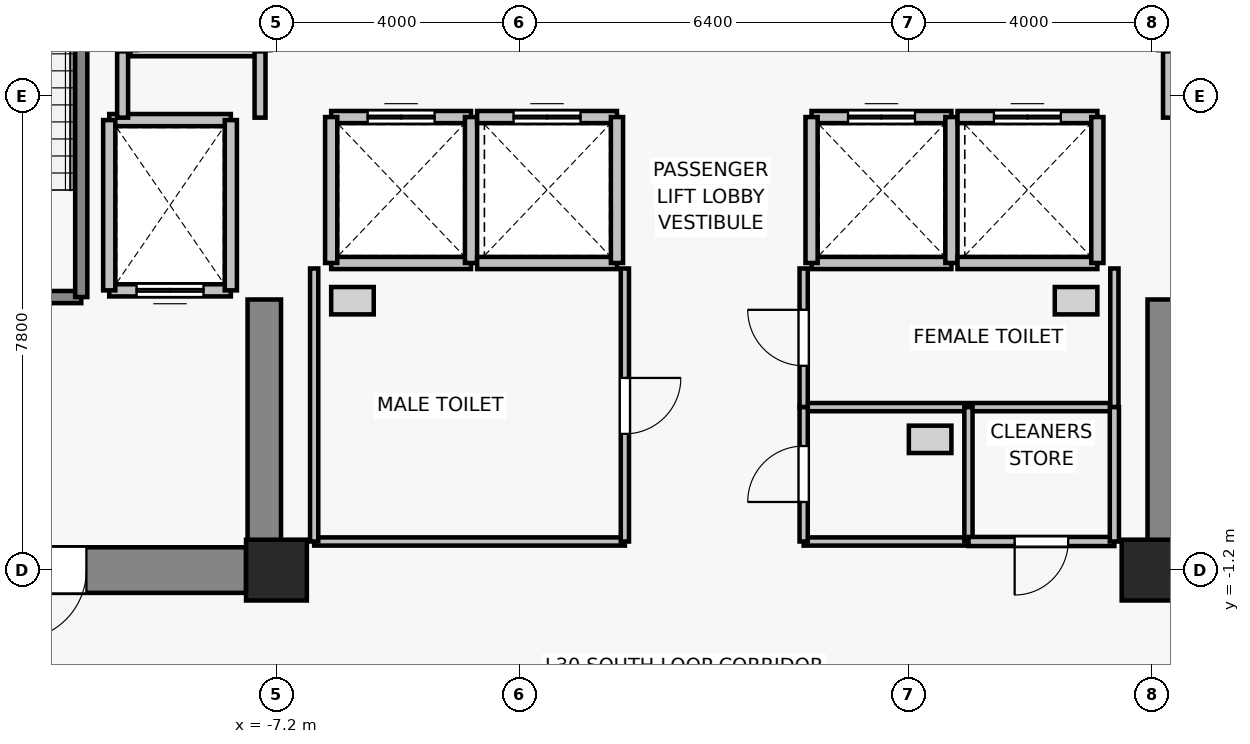
"""IFC4 building model, lengths in metres.
Left out: names, types, materials, properties, quantities, classifications, styles, units other than length and angle.
Written with IfcOpenShell. Run it as: python <this file> out.ifc"""

import sys

from ifc_helpers import new_model, si_unit, direction, frame, frame_2d, origin, origin_2d, place, context, subcontext, project, spatial, rectangle, extrude, source, transform, mapped, element, fill, save


model = new_model("IFC4")
c1 = context("Model", 3, precision=1e-05, world=origin(), true_north=direction((0.0, 1.0)))
c2 = subcontext(c1, "Body", "Model", "MODEL_VIEW")
j1 = project(units=[si_unit("LENGTHUNIT", "METRE"), si_unit("PLANEANGLEUNIT", "RADIAN")], contexts=[c1])
p1 = place(None, origin())
s1 = spatial("IfcSite", under=j1, at=p1, CompositionType="ELEMENT")
p2 = place(p1, origin())
s2 = spatial("IfcBuilding", under=s1, at=p2, CompositionType="ELEMENT")
p3 = place(p2, frame((0.0, 0.0, 109.9)))
s3 = spatial("IfcBuildingStorey", under=s2, at=p3, CompositionType="ELEMENT", Elevation=109.9)
for number, where, z_axis, x_axis in (
    (1, (-7.2, -1.2, 0.0), (0.0, 0.0, 1.0), (1.0, 0.0, 0.0)),
    (2, (7.2, -1.2, 0.0), (0.0, 0.0, 1.0), (1.0, 0.0, 0.0)),
):
    element("IfcColumn", number, at=place(p3, frame(where, z_axis=z_axis, x_axis=x_axis)), inside=s3, PredefinedType="COLUMN", context=c2, shape_type="SweptSolid", body=[
        extrude(rectangle(XDim=1.0, YDim=1.0, at=origin_2d()), origin(), (0.0, 0.0, 1.0), 3.3),
    ])
p4 = place(p3, frame((-7.7, -1.2, 0.0), z_axis=(0.0, 0.0, 1.0), x_axis=(-1.0, 0.0, 0.0)))
e3 = element("IfcWall", 3, at=p4, inside=s3, PredefinedType="SHEAR", context=c2, shape_type="SweptSolid", body=[
    extrude(rectangle(XDim=6.2, YDim=0.75, at=frame_2d((3.1, 0.0))), origin(), (0.0, 0.0, 1.0), 3.075),
])
p5 = place(p4, frame((2.625, 0.0, 0.0)))
e4 = element("IfcOpeningElement", 4, at=p5, cuts=e3, PredefinedType="OPENING", context=c2, shape_type="SweptSolid", body=[
    extrude(rectangle(XDim=1.15, YDim=2.15, at=frame_2d((0.575, 1.075))), frame((0.0, 0.385, 0.0), z_axis=(0.0, -1.0, 0.0), x_axis=(1.0, 0.0, 0.0)), (0.0, 0.0, 1.0), 0.77),
])
for number, where, z_axis, x_axis in (
    (5, (-7.4, -0.825, 0.0), (0.0, 0.0, 1.0), (0.0, 1.0, 0.0)),
    (6, (7.4, -0.825, 0.0), (0.0, 0.0, 1.0), (0.0, 1.0, 0.0)),
):
    element("IfcWall", number, at=place(p3, frame(where, z_axis=z_axis, x_axis=x_axis)), inside=s3, PredefinedType="SHEAR", context=c2, shape_type="SweptSolid", body=[
        extrude(rectangle(XDim=4.075, YDim=0.55, at=frame_2d((2.038, 0.0))), origin(), (0.0, 0.0, 1.0), 3.075),
    ])
p6 = place(p3, frame((-7.95, 3.4, 0.0), z_axis=(0.0, 0.0, 1.0), x_axis=(-1.0, 0.0, 0.0)))
e7 = element("IfcWall", 7, at=p6, inside=s3, PredefinedType="SOLIDWALL", context=c2, shape_type="SweptSolid", body=[
    extrude(rectangle(XDim=2.0, YDim=0.2, at=frame_2d((1.0, 0.0))), origin(), (0.0, 0.0, 1.0), 3.075),
])
p7 = place(p6, frame((0.45, 0.0, 0.0)))
e8 = element("IfcOpeningElement", 8, at=p7, cuts=e7, PredefinedType="OPENING", context=c2, shape_type="SweptSolid", body=[
    extrude(rectangle(XDim=1.1, YDim=2.2, at=frame_2d((0.55, 1.1))), frame((0.0, 0.11, 0.0), z_axis=(0.0, -1.0, 0.0), x_axis=(1.0, 0.0, 0.0)), (0.0, 0.0, 1.0), 0.22),
])
p8 = place(p3, frame((-9.95, 6.2, 0.0), z_axis=(0.0, 0.0, 1.0), x_axis=(1.0, 0.0, 0.0)))
e9 = element("IfcWall", 9, at=p8, inside=s3, PredefinedType="SOLIDWALL", context=c2, shape_type="SweptSolid", body=[
    extrude(rectangle(XDim=2.0, YDim=0.2, at=frame_2d((1.0, 0.0))), origin(), (0.0, 0.0, 1.0), 3.075),
])
for number, where, z_axis, x_axis in (
    (10, (-9.95, 3.4, 0.0), (0.0, 0.0, 1.0), (0.0, 1.0, 0.0)),
    (11, (-7.95, 6.2, 0.0), (0.0, 0.0, 1.0), (0.0, -1.0, 0.0)),
):
    element("IfcWall", number, at=place(p3, frame(where, z_axis=z_axis, x_axis=x_axis)), inside=s3, PredefinedType="SOLIDWALL", context=c2, shape_type="SweptSolid", body=[
        extrude(rectangle(XDim=2.8, YDim=0.2, at=frame_2d((1.4, 0.0))), origin(), (0.0, 0.0, 1.0), 3.075),
    ])
p9 = place(p3, frame((-4.0, 3.85, 0.0), z_axis=(0.0, 0.0, 1.0), x_axis=(-1.0, 0.0, 0.0)))
e12 = element("IfcWall", 12, at=p9, inside=s3, PredefinedType="SOLIDWALL", context=c2, shape_type="SweptSolid", body=[
    extrude(rectangle(XDim=2.3, YDim=0.2, at=frame_2d((1.15, 0.0))), origin(), (0.0, 0.0, 1.0), 3.075),
])
p10 = place(p3, frame((-6.3, 6.25, 0.0), z_axis=(0.0, 0.0, 1.0), x_axis=(1.0, 0.0, 0.0)))
e13 = element("IfcWall", 13, at=p10, inside=s3, PredefinedType="SOLIDWALL", context=c2, shape_type="SweptSolid", body=[
    extrude(rectangle(XDim=2.3, YDim=0.2, at=frame_2d((1.15, 0.0))), origin(), (0.0, 0.0, 1.0), 3.075),
])
p11 = place(p10, frame((0.6, 0.0, 0.0)))
e14 = element("IfcOpeningElement", 14, at=p11, cuts=e13, PredefinedType="OPENING", context=c2, shape_type="SweptSolid", body=[
    extrude(rectangle(XDim=1.1, YDim=2.2, at=frame_2d((0.55, 1.1))), frame((0.0, 0.11, 0.0), z_axis=(0.0, -1.0, 0.0), x_axis=(1.0, 0.0, 0.0)), (0.0, 0.0, 1.0), 0.22),
])
for number, where, z_axis, x_axis in (
    (15, (-6.3, 3.85, 0.0), (0.0, 0.0, 1.0), (0.0, 1.0, 0.0)),
    (16, (-4.0, 6.25, 0.0), (0.0, 0.0, 1.0), (0.0, -1.0, 0.0)),
):
    element("IfcWall", number, at=place(p3, frame(where, z_axis=z_axis, x_axis=x_axis)), inside=s3, PredefinedType="SOLIDWALL", context=c2, shape_type="SweptSolid", body=[
        extrude(rectangle(XDim=2.4, YDim=0.2, at=frame_2d((1.2, 0.0))), origin(), (0.0, 0.0, 1.0), 3.075),
    ])
p12 = place(p3, frame((-1.6, 3.85, 0.0), z_axis=(0.0, 0.0, 1.0), x_axis=(-1.0, 0.0, 0.0)))
e17 = element("IfcWall", 17, at=p12, inside=s3, PredefinedType="SOLIDWALL", context=c2, shape_type="SweptSolid", body=[
    extrude(rectangle(XDim=2.3, YDim=0.2, at=frame_2d((1.15, 0.0))), origin(), (0.0, 0.0, 1.0), 3.075),
])
p13 = place(p3, frame((-3.9, 6.25, 0.0), z_axis=(0.0, 0.0, 1.0), x_axis=(1.0, 0.0, 0.0)))
e18 = element("IfcWall", 18, at=p13, inside=s3, PredefinedType="SOLIDWALL", context=c2, shape_type="SweptSolid", body=[
    extrude(rectangle(XDim=2.3, YDim=0.2, at=frame_2d((1.15, 0.0))), origin(), (0.0, 0.0, 1.0), 3.075),
])
p14 = place(p13, frame((0.6, 0.0, 0.0)))
e19 = element("IfcOpeningElement", 19, at=p14, cuts=e18, PredefinedType="OPENING", context=c2, shape_type="SweptSolid", body=[
    extrude(rectangle(XDim=1.1, YDim=2.2, at=frame_2d((0.55, 1.1))), frame((0.0, 0.11, 0.0), z_axis=(0.0, -1.0, 0.0), x_axis=(1.0, 0.0, 0.0)), (0.0, 0.0, 1.0), 0.22),
])
p15 = place(p3, frame((-1.6, 6.25, 0.0), z_axis=(0.0, 0.0, 1.0), x_axis=(0.0, -1.0, 0.0)))
e20 = element("IfcWall", 20, at=p15, inside=s3, PredefinedType="SOLIDWALL", context=c2, shape_type="SweptSolid", body=[
    extrude(rectangle(XDim=2.4, YDim=0.2, at=frame_2d((1.2, 0.0))), origin(), (0.0, 0.0, 1.0), 3.075),
])
p16 = place(p3, frame((3.9, 3.85, 0.0), z_axis=(0.0, 0.0, 1.0), x_axis=(-1.0, 0.0, 0.0)))
e21 = element("IfcWall", 21, at=p16, inside=s3, PredefinedType="SOLIDWALL", context=c2, shape_type="SweptSolid", body=[
    extrude(rectangle(XDim=2.3, YDim=0.2, at=frame_2d((1.15, 0.0))), origin(), (0.0, 0.0, 1.0), 3.075),
])
p17 = place(p3, frame((1.6, 6.25, 0.0), z_axis=(0.0, 0.0, 1.0), x_axis=(1.0, 0.0, 0.0)))
e22 = element("IfcWall", 22, at=p17, inside=s3, PredefinedType="SOLIDWALL", context=c2, shape_type="SweptSolid", body=[
    extrude(rectangle(XDim=2.3, YDim=0.2, at=frame_2d((1.15, 0.0))), origin(), (0.0, 0.0, 1.0), 3.075),
])
p18 = place(p17, frame((0.6, 0.0, 0.0)))
e23 = element("IfcOpeningElement", 23, at=p18, cuts=e22, PredefinedType="OPENING", context=c2, shape_type="SweptSolid", body=[
    extrude(rectangle(XDim=1.1, YDim=2.2, at=frame_2d((0.55, 1.1))), frame((0.0, 0.11, 0.0), z_axis=(0.0, -1.0, 0.0), x_axis=(1.0, 0.0, 0.0)), (0.0, 0.0, 1.0), 0.22),
])
for number, where, z_axis, x_axis in (
    (24, (1.6, 3.85, 0.0), (0.0, 0.0, 1.0), (0.0, 1.0, 0.0)),
    (25, (3.9, 6.25, 0.0), (0.0, 0.0, 1.0), (0.0, -1.0, 0.0)),
):
    element("IfcWall", number, at=place(p3, frame(where, z_axis=z_axis, x_axis=x_axis)), inside=s3, PredefinedType="SOLIDWALL", context=c2, shape_type="SweptSolid", body=[
        extrude(rectangle(XDim=2.4, YDim=0.2, at=frame_2d((1.2, 0.0))), origin(), (0.0, 0.0, 1.0), 3.075),
    ])
p19 = place(p3, frame((6.3, 3.85, 0.0), z_axis=(0.0, 0.0, 1.0), x_axis=(-1.0, 0.0, 0.0)))
e26 = element("IfcWall", 26, at=p19, inside=s3, PredefinedType="SOLIDWALL", context=c2, shape_type="SweptSolid", body=[
    extrude(rectangle(XDim=2.3, YDim=0.2, at=frame_2d((1.15, 0.0))), origin(), (0.0, 0.0, 1.0), 3.075),
])
p20 = place(p3, frame((4.0, 6.25, 0.0), z_axis=(0.0, 0.0, 1.0), x_axis=(1.0, 0.0, 0.0)))
e27 = element("IfcWall", 27, at=p20, inside=s3, PredefinedType="SOLIDWALL", context=c2, shape_type="SweptSolid", body=[
    extrude(rectangle(XDim=2.3, YDim=0.2, at=frame_2d((1.15, 0.0))), origin(), (0.0, 0.0, 1.0), 3.075),
])
p21 = place(p20, frame((0.6, 0.0, 0.0)))
e28 = element("IfcOpeningElement", 28, at=p21, cuts=e27, PredefinedType="OPENING", context=c2, shape_type="SweptSolid", body=[
    extrude(rectangle(XDim=1.1, YDim=2.2, at=frame_2d((0.55, 1.1))), frame((0.0, 0.11, 0.0), z_axis=(0.0, -1.0, 0.0), x_axis=(1.0, 0.0, 0.0)), (0.0, 0.0, 1.0), 0.22),
])
p22 = place(p3, frame((6.3, 6.25, 0.0), z_axis=(0.0, 0.0, 1.0), x_axis=(0.0, -1.0, 0.0)))
e29 = element("IfcWall", 29, at=p22, inside=s3, PredefinedType="SOLIDWALL", context=c2, shape_type="SweptSolid", body=[
    extrude(rectangle(XDim=2.4, YDim=0.2, at=frame_2d((1.2, 0.0))), origin(), (0.0, 0.0, 1.0), 3.075),
])
for number, where, z_axis, x_axis in (
    (30, (-7.4, 7.35, 0.0), (0.0, 0.0, 1.0), (-1.0, 0.0, 0.0)),
    (31, (9.6, 7.35, 0.0), (0.0, 0.0, 1.0), (-1.0, 0.0, 0.0)),
):
    element("IfcWall", number, at=place(p3, frame(where, z_axis=z_axis, x_axis=x_axis)), inside=s3, PredefinedType="SOLIDWALL", context=c2, shape_type="SweptSolid", body=[
        extrude(rectangle(XDim=2.2, YDim=0.2, at=frame_2d((1.1, 0.0))), origin(), (0.0, 0.0, 1.0), 2.515),
    ])
p23 = place(p3, frame((-10.41, 3.29, 0.0), z_axis=(0.0, 0.0, 1.0), x_axis=(-1.0, 0.0, 0.0)))
e32 = element("IfcWall", 32, at=p23, inside=s3, PredefinedType="SOLIDWALL", context=c2, shape_type="SweptSolid", body=[
    extrude(rectangle(XDim=3.52, YDim=0.2, at=frame_2d((1.76, 0.0))), origin(), (0.0, 0.0, 1.0), 3.075),
])
p24 = place(p23, frame((1.165, 0.0, 0.0)))
e33 = element("IfcOpeningElement", 33, at=p24, cuts=e32, PredefinedType="OPENING", context=c2, shape_type="SweptSolid", body=[
    extrude(rectangle(XDim=1.15, YDim=2.15, at=frame_2d((0.575, 1.075))), frame((0.0, 0.11, 0.0), z_axis=(0.0, -1.0, 0.0), x_axis=(1.0, 0.0, 0.0)), (0.0, 0.0, 1.0), 0.22),
])
p25 = place(p3, frame((-10.41, 12.13, 0.0), z_axis=(0.0, 0.0, 1.0), x_axis=(0.0, -1.0, 0.0)))
e34 = element("IfcWall", 34, at=p25, inside=s3, PredefinedType="SOLIDWALL", context=c2, shape_type="SweptSolid", body=[
    extrude(rectangle(XDim=8.84, YDim=0.2, at=frame_2d((4.42, 0.0))), origin(), (0.0, 0.0, 1.0), 3.075),
])
p26 = place(p3, frame((-9.73, 6.24, 0.0), z_axis=(0.0, 0.0, 1.0), x_axis=(0.0, 1.0, 0.0)))
e35 = element("IfcWall", 35, at=p26, inside=s3, PredefinedType="PARTITIONING", context=c2, shape_type="SweptSolid", body=[
    extrude(rectangle(XDim=1.09, YDim=0.18, at=frame_2d((0.545, 0.0))), origin(), (0.0, 0.0, 1.0), 3.075),
])
for number, where, z_axis, x_axis in (
    (36, (-7.47, 7.33, 0.0), (0.0, 0.0, 1.0), (0.0, -1.0, 0.0)),
    (37, (7.47, 6.24, 0.0), (0.0, 0.0, 1.0), (0.0, 1.0, 0.0)),
):
    element("IfcWall", number, at=place(p3, frame(where, z_axis=z_axis, x_axis=x_axis)), inside=s3, PredefinedType="PARTITIONING", context=c2, shape_type="SweptSolid", body=[
        extrude(rectangle(XDim=1.09, YDim=0.18, at=frame_2d((0.545, 0.0))), origin(), (0.0, 0.0, 1.0), 2.515),
    ])
p27 = place(p3, frame((-1.47, -0.73, 0.0), z_axis=(0.0, 0.0, 1.0), x_axis=(-1.0, 0.0, 0.0)))
e38 = element("IfcWall", 38, at=p27, inside=s3, PredefinedType="PARTITIONING", context=c2, shape_type="SweptSolid", body=[
    extrude(rectangle(XDim=5.11, YDim=0.135, at=frame_2d((2.555, 0.0))), origin(), (0.0, 0.0, 1.0), 3.075),
])
p28 = place(p3, frame((-6.58, -0.73, 0.0), z_axis=(0.0, 0.0, 1.0), x_axis=(0.0, 1.0, 0.0)))
e39 = element("IfcWall", 39, at=p28, inside=s3, PredefinedType="PARTITIONING", context=c2, shape_type="SweptSolid", body=[
    extrude(rectangle(XDim=4.49, YDim=0.135, at=frame_2d((2.245, 0.0))), origin(), (0.0, 0.0, 1.0), 3.075),
])
p29 = place(p3, frame((-1.47, 3.76, 0.0), z_axis=(0.0, 0.0, 1.0), x_axis=(0.0, -1.0, 0.0)))
e40 = element("IfcWall", 40, at=p29, inside=s3, PredefinedType="PARTITIONING", context=c2, shape_type="SweptSolid", body=[
    extrude(rectangle(XDim=4.49, YDim=0.135, at=frame_2d((2.245, 0.0))), origin(), (0.0, 0.0, 1.0), 3.075),
])
p30 = place(p29, frame((1.8, 0.0, 0.0)))
e41 = element("IfcOpeningElement", 41, at=p30, cuts=e40, PredefinedType="OPENING", context=c2, shape_type="SweptSolid", body=[
    extrude(rectangle(XDim=0.92, YDim=2.1, at=frame_2d((0.46, 1.05))), frame((0.0, 0.077, 0.0), z_axis=(0.0, -1.0, 0.0), x_axis=(1.0, 0.0, 0.0)), (0.0, 0.0, 1.0), 0.155),
])
p31 = place(p3, frame((6.58, 1.48, 0.0), z_axis=(0.0, 0.0, 1.0), x_axis=(-1.0, 0.0, 0.0)))
e42 = element("IfcWall", 42, at=p31, inside=s3, PredefinedType="PARTITIONING", context=c2, shape_type="SweptSolid", body=[
    extrude(rectangle(XDim=5.11, YDim=0.135, at=frame_2d((2.555, 0.0))), origin(), (0.0, 0.0, 1.0), 3.075),
])
p32 = place(p3, frame((1.47, 1.48, 0.0), z_axis=(0.0, 0.0, 1.0), x_axis=(0.0, 1.0, 0.0)))
e43 = element("IfcWall", 43, at=p32, inside=s3, PredefinedType="PARTITIONING", context=c2, shape_type="SweptSolid", body=[
    extrude(rectangle(XDim=2.28, YDim=0.135, at=frame_2d((1.14, 0.0))), origin(), (0.0, 0.0, 1.0), 3.075),
])
p33 = place(p32, frame((0.68, 0.0, 0.0)))
e44 = element("IfcOpeningElement", 44, at=p33, cuts=e43, PredefinedType="OPENING", context=c2, shape_type="SweptSolid", body=[
    extrude(rectangle(XDim=0.92, YDim=2.1, at=frame_2d((0.46, 1.05))), frame((0.0, 0.077, 0.0), z_axis=(0.0, -1.0, 0.0), x_axis=(1.0, 0.0, 0.0)), (0.0, 0.0, 1.0), 0.155),
])
p34 = place(p3, frame((6.58, 3.76, 0.0), z_axis=(0.0, 0.0, 1.0), x_axis=(0.0, -1.0, 0.0)))
e45 = element("IfcWall", 45, at=p34, inside=s3, PredefinedType="PARTITIONING", context=c2, shape_type="SweptSolid", body=[
    extrude(rectangle(XDim=2.28, YDim=0.135, at=frame_2d((1.14, 0.0))), origin(), (0.0, 0.0, 1.0), 3.075),
])
p35 = place(p3, frame((4.18, -0.73, 0.0), z_axis=(0.0, 0.0, 1.0), x_axis=(-1.0, 0.0, 0.0)))
e46 = element("IfcWall", 46, at=p35, inside=s3, PredefinedType="PARTITIONING", context=c2, shape_type="SweptSolid", body=[
    extrude(rectangle(XDim=2.71, YDim=0.135, at=frame_2d((1.355, 0.0))), origin(), (0.0, 0.0, 1.0), 3.075),
])
p36 = place(p3, frame((1.47, -0.73, 0.0), z_axis=(0.0, 0.0, 1.0), x_axis=(0.0, 1.0, 0.0)))
e47 = element("IfcWall", 47, at=p36, inside=s3, PredefinedType="PARTITIONING", context=c2, shape_type="SweptSolid", body=[
    extrude(rectangle(XDim=2.21, YDim=0.135, at=frame_2d((1.105, 0.0))), origin(), (0.0, 0.0, 1.0), 3.075),
])
p37 = place(p36, frame((0.65, 0.0, 0.0)))
e48 = element("IfcOpeningElement", 48, at=p37, cuts=e47, PredefinedType="OPENING", context=c2, shape_type="SweptSolid", body=[
    extrude(rectangle(XDim=0.92, YDim=2.1, at=frame_2d((0.46, 1.05))), frame((0.0, 0.077, 0.0), z_axis=(0.0, -1.0, 0.0), x_axis=(1.0, 0.0, 0.0)), (0.0, 0.0, 1.0), 0.155),
])
p38 = place(p3, frame((4.18, 1.48, 0.0), z_axis=(0.0, 0.0, 1.0), x_axis=(0.0, -1.0, 0.0)))
e49 = element("IfcWall", 49, at=p38, inside=s3, PredefinedType="PARTITIONING", context=c2, shape_type="SweptSolid", body=[
    extrude(rectangle(XDim=2.21, YDim=0.135, at=frame_2d((1.105, 0.0))), origin(), (0.0, 0.0, 1.0), 3.075),
])
p39 = place(p3, frame((6.58, -0.73, 0.0), z_axis=(0.0, 0.0, 1.0), x_axis=(-1.0, 0.0, 0.0)))
e50 = element("IfcWall", 50, at=p39, inside=s3, PredefinedType="PARTITIONING", context=c2, shape_type="SweptSolid", body=[
    extrude(rectangle(XDim=2.4, YDim=0.15, at=frame_2d((1.2, 0.0))), origin(), (0.0, 0.0, 1.0), 3.075),
])
p40 = place(p39, frame((0.76, 0.0, 0.0)))
e51 = element("IfcOpeningElement", 51, at=p40, cuts=e50, PredefinedType="OPENING", context=c2, shape_type="SweptSolid", body=[
    extrude(rectangle(XDim=0.88, YDim=2.1, at=frame_2d((0.44, 1.05))), frame((0.0, 0.085, 0.0), z_axis=(0.0, -1.0, 0.0), x_axis=(1.0, 0.0, 0.0)), (0.0, 0.0, 1.0), 0.17),
])
p41 = place(p3, frame((6.58, 1.48, 0.0), z_axis=(0.0, 0.0, 1.0), x_axis=(0.0, -1.0, 0.0)))
e52 = element("IfcWall", 52, at=p41, inside=s3, PredefinedType="PARTITIONING", context=c2, shape_type="SweptSolid", body=[
    extrude(rectangle(XDim=2.21, YDim=0.15, at=frame_2d((1.105, 0.0))), origin(), (0.0, 0.0, 1.0), 3.075),
])
m1 = source(origin(), c2, "Body", "SweptSolid", [
    extrude(rectangle(XDim=1.1, YDim=2.2, at=frame_2d((0.55, 1.1))), frame((0.0, 0.025, 0.0), z_axis=(0.0, -1.0, 0.0), x_axis=(1.0, 0.0, 0.0)), (0.0, 0.0, 1.0), 0.05),
])
p42 = place(p7, origin())
e53 = element("IfcDoor", 53, at=p42, inside=s3, OperationType="DOUBLE_DOOR_SLIDING", PredefinedType="DOOR", context=c2, shape_type="MappedRepresentation", body=[
    mapped(m1, transform((0.0, 0.0, 0.0), x_axis=(1.0, 0.0, 0.0), y_axis=(0.0, 1.0, 0.0), z_axis=(0.0, 0.0, 1.0), scale=1.0)),
])
fill(e8, e53)
p43 = place(p11, origin())
e54 = element("IfcDoor", 54, at=p43, inside=s3, OperationType="DOUBLE_DOOR_SLIDING", PredefinedType="DOOR", context=c2, shape_type="MappedRepresentation", body=[
    mapped(m1, transform((0.0, 0.0, 0.0), x_axis=(1.0, 0.0, 0.0), y_axis=(0.0, 1.0, 0.0), z_axis=(0.0, 0.0, 1.0), scale=1.0)),
])
fill(e14, e54)
p44 = place(p14, origin())
e55 = element("IfcDoor", 55, at=p44, inside=s3, OperationType="DOUBLE_DOOR_SLIDING", PredefinedType="DOOR", context=c2, shape_type="MappedRepresentation", body=[
    mapped(m1, transform((0.0, 0.0, 0.0), x_axis=(1.0, 0.0, 0.0), y_axis=(0.0, 1.0, 0.0), z_axis=(0.0, 0.0, 1.0), scale=1.0)),
])
fill(e19, e55)
p45 = place(p18, origin())
e56 = element("IfcDoor", 56, at=p45, inside=s3, OperationType="DOUBLE_DOOR_SLIDING", PredefinedType="DOOR", context=c2, shape_type="MappedRepresentation", body=[
    mapped(m1, transform((0.0, 0.0, 0.0), x_axis=(1.0, 0.0, 0.0), y_axis=(0.0, 1.0, 0.0), z_axis=(0.0, 0.0, 1.0), scale=1.0)),
])
fill(e23, e56)
p46 = place(p21, origin())
e57 = element("IfcDoor", 57, at=p46, inside=s3, OperationType="DOUBLE_DOOR_SLIDING", PredefinedType="DOOR", context=c2, shape_type="MappedRepresentation", body=[
    mapped(m1, transform((0.0, 0.0, 0.0), x_axis=(1.0, 0.0, 0.0), y_axis=(0.0, 1.0, 0.0), z_axis=(0.0, 0.0, 1.0), scale=1.0)),
])
fill(e28, e57)
m2 = source(origin(), c2, "Body", "SweptSolid", [
    extrude(rectangle(XDim=1.15, YDim=2.15, at=frame_2d((0.575, 1.075))), frame((0.0, 0.025, 0.0), z_axis=(0.0, -1.0, 0.0), x_axis=(1.0, 0.0, 0.0)), (0.0, 0.0, 1.0), 0.05),
])
p47 = place(p5, origin())
e58 = element("IfcDoor", 58, at=p47, inside=s3, OperationType="SINGLE_SWING_RIGHT", PredefinedType="DOOR", context=c2, shape_type="MappedRepresentation", body=[
    mapped(m2, transform((0.0, 0.0, 0.0), x_axis=(1.0, 0.0, 0.0), y_axis=(0.0, 1.0, 0.0), z_axis=(0.0, 0.0, 1.0), scale=1.0)),
])
fill(e4, e58)
m3 = source(origin(), c2, "Body", "SweptSolid", [
    extrude(rectangle(XDim=0.92, YDim=2.1, at=frame_2d((0.46, 1.05))), frame((0.0, 0.025, 0.0), z_axis=(0.0, -1.0, 0.0), x_axis=(1.0, 0.0, 0.0)), (0.0, 0.0, 1.0), 0.05),
])
p48 = place(p30, origin())
e59 = element("IfcDoor", 59, at=p48, inside=s3, OperationType="SINGLE_SWING_LEFT", PredefinedType="DOOR", context=c2, shape_type="MappedRepresentation", body=[
    mapped(m3, transform((0.0, 0.0, 0.0), x_axis=(1.0, 0.0, 0.0), y_axis=(0.0, 1.0, 0.0), z_axis=(0.0, 0.0, 1.0), scale=1.0)),
])
fill(e41, e59)
p49 = place(p33, origin())
e60 = element("IfcDoor", 60, at=p49, inside=s3, OperationType="SINGLE_SWING_RIGHT", PredefinedType="DOOR", context=c2, shape_type="MappedRepresentation", body=[
    mapped(m3, transform((0.0, 0.0, 0.0), x_axis=(1.0, 0.0, 0.0), y_axis=(0.0, 1.0, 0.0), z_axis=(0.0, 0.0, 1.0), scale=1.0)),
])
fill(e44, e60)
p50 = place(p37, origin())
e61 = element("IfcDoor", 61, at=p50, inside=s3, OperationType="SINGLE_SWING_LEFT", PredefinedType="DOOR", context=c2, shape_type="MappedRepresentation", body=[
    mapped(m3, transform((0.0, 0.0, 0.0), x_axis=(1.0, 0.0, 0.0), y_axis=(0.0, 1.0, 0.0), z_axis=(0.0, 0.0, 1.0), scale=1.0)),
])
fill(e48, e61)
m4 = source(origin(), c2, "Body", "SweptSolid", [
    extrude(rectangle(XDim=0.88, YDim=2.1, at=frame_2d((0.44, 1.05))), frame((0.0, 0.025, 0.0), z_axis=(0.0, -1.0, 0.0), x_axis=(1.0, 0.0, 0.0)), (0.0, 0.0, 1.0), 0.05),
])
p51 = place(p40, origin())
e62 = element("IfcDoor", 62, at=p51, inside=s3, OperationType="SINGLE_SWING_RIGHT", PredefinedType="DOOR", context=c2, shape_type="MappedRepresentation", body=[
    mapped(m4, transform((0.0, 0.0, 0.0), x_axis=(1.0, 0.0, 0.0), y_axis=(0.0, 1.0, 0.0), z_axis=(0.0, 0.0, 1.0), scale=1.0)),
])
fill(e51, e62)
save(model, sys.argv[1])
